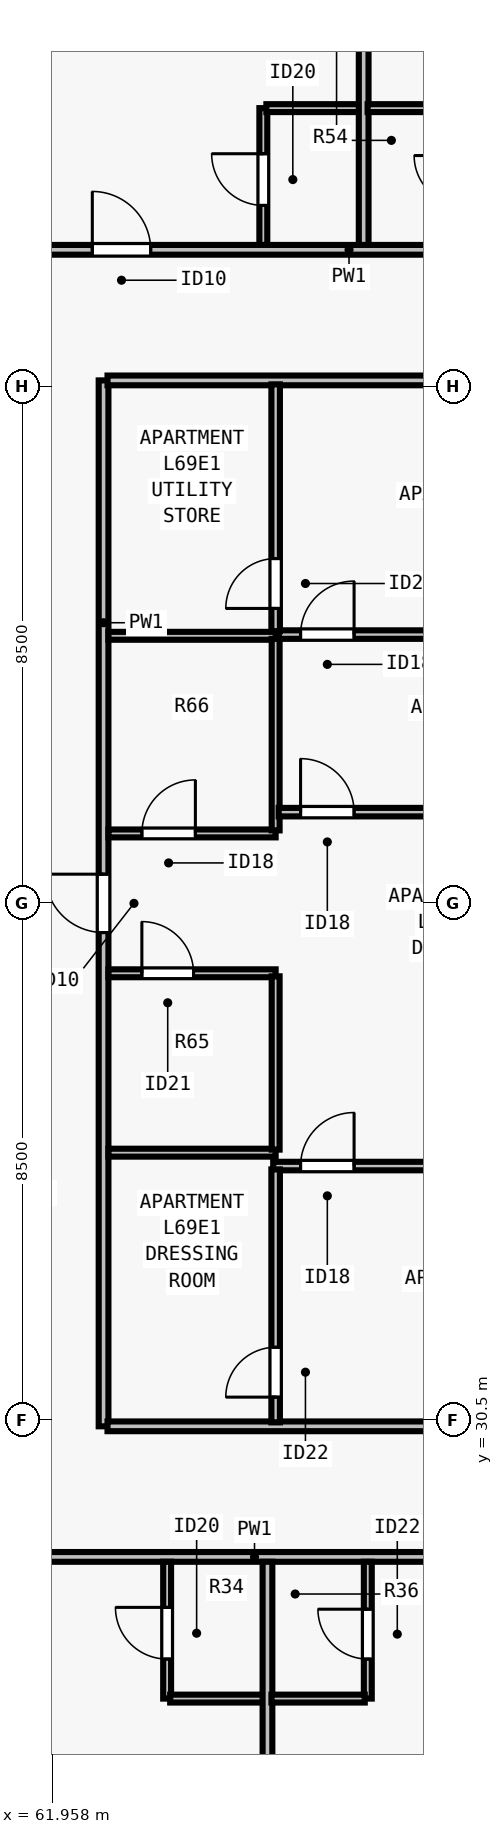
"""IFC4 building model, lengths in metres.
Left out: names, types, materials, properties, quantities, classifications, styles, units other than length and angle.
Written with IfcOpenShell. Run it as: python <this file> out.ifc"""

import sys

from ifc_helpers import new_model, si_unit, direction, frame, frame_2d, origin, place, context, subcontext, project, spatial, rectangle, extrude, element, fill, save


model = new_model("IFC4")
c1 = context("Model", 3, precision=1e-05, world=origin(), true_north=direction((0.0, 1.0)))
c2 = subcontext(c1, "Body", "Model", "MODEL_VIEW")
j1 = project(units=[si_unit("LENGTHUNIT", "METRE"), si_unit("PLANEANGLEUNIT", "RADIAN")], contexts=[c1])
p1 = place(None, origin())
s1 = spatial("IfcSite", under=j1, at=p1, CompositionType="ELEMENT")
p2 = place(p1, origin())
s2 = spatial("IfcBuilding", under=s1, at=p2, CompositionType="ELEMENT")
p3 = place(p2, frame((0.0, 0.0, 251.5)))
s3 = spatial("IfcBuildingStorey", under=s2, at=p3, CompositionType="ELEMENT", Elevation=251.5)
p4 = place(p3, frame((29.915, 28.252, 0.0), z_axis=(0.0, 0.0, 1.0), x_axis=(1.0, 0.0, 0.0)))
e1 = element("IfcWall", 1, at=p4, inside=s3, PredefinedType="PARTITIONING", context=c2, shape_type="SweptSolid", body=[
    extrude(rectangle(XDim=44.28, YDim=0.16, at=frame_2d((22.14, 0.0))), origin(), (0.0, 0.0, 1.0), 2.958),
])
p5 = place(p4, frame((5.002, 0.0, 0.0)))
e2 = element("IfcOpeningElement", 2, at=p5, cuts=e1, PredefinedType="OPENING", context=c2, shape_type="SweptSolid", body=[
    extrude(rectangle(XDim=0.96, YDim=2.18, at=frame_2d((0.48, 1.09))), frame((0.0, 0.09, 0.0), z_axis=(0.0, -1.0, 0.0), x_axis=(1.0, 0.0, 0.0)), (0.0, 0.0, 1.0), 0.18),
])
p6 = place(p4, frame((12.718, 0.0, 0.0)))
e3 = element("IfcOpeningElement", 3, at=p6, cuts=e1, PredefinedType="OPENING", context=c2, shape_type="SweptSolid", body=[
    extrude(rectangle(XDim=0.96, YDim=2.18, at=frame_2d((0.48, 1.09))), frame((0.0, 0.09, 0.0), z_axis=(0.0, -1.0, 0.0), x_axis=(1.0, 0.0, 0.0)), (0.0, 0.0, 1.0), 0.18),
])
p7 = place(p4, frame((21.55, 0.0, 0.0)))
e4 = element("IfcOpeningElement", 4, at=p7, cuts=e1, PredefinedType="OPENING", context=c2, shape_type="SweptSolid", body=[
    extrude(rectangle(XDim=0.96, YDim=2.18, at=frame_2d((0.48, 1.09))), frame((0.0, 0.09, 0.0), z_axis=(0.0, -1.0, 0.0), x_axis=(1.0, 0.0, 0.0)), (0.0, 0.0, 1.0), 0.18),
])
p8 = place(p4, frame((30.382, 0.0, 0.0)))
e5 = element("IfcOpeningElement", 5, at=p8, cuts=e1, PredefinedType="OPENING", context=c2, shape_type="SweptSolid", body=[
    extrude(rectangle(XDim=0.96, YDim=2.18, at=frame_2d((0.48, 1.09))), frame((0.0, 0.09, 0.0), z_axis=(0.0, -1.0, 0.0), x_axis=(1.0, 0.0, 0.0)), (0.0, 0.0, 1.0), 0.18),
])
p9 = place(p4, frame((39.393, 0.0, 0.0)))
e6 = element("IfcOpeningElement", 6, at=p9, cuts=e1, PredefinedType="OPENING", context=c2, shape_type="SweptSolid", body=[
    extrude(rectangle(XDim=0.96, YDim=2.18, at=frame_2d((0.48, 1.09))), frame((0.0, 0.09, 0.0), z_axis=(0.0, -1.0, 0.0), x_axis=(1.0, 0.0, 0.0)), (0.0, 0.0, 1.0), 0.18),
])
p10 = place(p3, frame((29.805, 49.748, 0.0), z_axis=(0.0, 0.0, 1.0), x_axis=(1.0, 0.0, 0.0)))
e7 = element("IfcWall", 7, at=p10, inside=s3, PredefinedType="PARTITIONING", context=c2, shape_type="SweptSolid", body=[
    extrude(rectangle(XDim=44.39, YDim=0.16, at=frame_2d((22.195, 0.0))), origin(), (0.0, 0.0, 1.0), 2.958),
])
p11 = place(p10, frame((3.494, 0.0, 0.0)))
e8 = element("IfcOpeningElement", 8, at=p11, cuts=e7, PredefinedType="OPENING", context=c2, shape_type="SweptSolid", body=[
    extrude(rectangle(XDim=0.96, YDim=2.18, at=frame_2d((0.48, 1.09))), frame((0.0, 0.09, 0.0), z_axis=(0.0, -1.0, 0.0), x_axis=(1.0, 0.0, 0.0)), (0.0, 0.0, 1.0), 0.18),
])
p12 = place(p10, frame((10.73, 0.0, 0.0)))
e9 = element("IfcOpeningElement", 9, at=p12, cuts=e7, PredefinedType="OPENING", context=c2, shape_type="SweptSolid", body=[
    extrude(rectangle(XDim=0.96, YDim=2.18, at=frame_2d((0.48, 1.09))), frame((0.0, 0.09, 0.0), z_axis=(0.0, -1.0, 0.0), x_axis=(1.0, 0.0, 0.0)), (0.0, 0.0, 1.0), 0.18),
])
p13 = place(p10, frame((18.09, 0.0, 0.0)))
e10 = element("IfcOpeningElement", 10, at=p13, cuts=e7, PredefinedType="OPENING", context=c2, shape_type="SweptSolid", body=[
    extrude(rectangle(XDim=0.96, YDim=2.18, at=frame_2d((0.48, 1.09))), frame((0.0, 0.09, 0.0), z_axis=(0.0, -1.0, 0.0), x_axis=(1.0, 0.0, 0.0)), (0.0, 0.0, 1.0), 0.18),
])
p14 = place(p10, frame((25.45, 0.0, 0.0)))
e11 = element("IfcOpeningElement", 11, at=p14, cuts=e7, PredefinedType="OPENING", context=c2, shape_type="SweptSolid", body=[
    extrude(rectangle(XDim=0.96, YDim=2.18, at=frame_2d((0.48, 1.09))), frame((0.0, 0.09, 0.0), z_axis=(0.0, -1.0, 0.0), x_axis=(1.0, 0.0, 0.0)), (0.0, 0.0, 1.0), 0.18),
])
p15 = place(p10, frame((32.81, 0.0, 0.0)))
e12 = element("IfcOpeningElement", 12, at=p15, cuts=e7, PredefinedType="OPENING", context=c2, shape_type="SweptSolid", body=[
    extrude(rectangle(XDim=0.96, YDim=2.18, at=frame_2d((0.48, 1.09))), frame((0.0, 0.09, 0.0), z_axis=(0.0, -1.0, 0.0), x_axis=(1.0, 0.0, 0.0)), (0.0, 0.0, 1.0), 0.18),
])
p16 = place(p10, frame((40.294, 0.0, 0.0)))
e13 = element("IfcOpeningElement", 13, at=p16, cuts=e7, PredefinedType="OPENING", context=c2, shape_type="SweptSolid", body=[
    extrude(rectangle(XDim=0.96, YDim=2.18, at=frame_2d((0.48, 1.09))), frame((0.0, 0.09, 0.0), z_axis=(0.0, -1.0, 0.0), x_axis=(1.0, 0.0, 0.0)), (0.0, 0.0, 1.0), 0.18),
])
p17 = place(p3, frame((62.8, 30.4, 0.0), z_axis=(0.0, 0.0, 1.0), x_axis=(0.0, 1.0, 0.0)))
e14 = element("IfcWall", 14, at=p17, inside=s3, PredefinedType="PARTITIONING", context=c2, shape_type="SweptSolid", body=[
    extrude(rectangle(XDim=17.2, YDim=0.16, at=frame_2d((8.6, 0.0))), origin(), (0.0, 0.0, 1.0), 3.29),
])
p18 = place(p17, frame((8.12, 0.0, 0.0)))
e15 = element("IfcOpeningElement", 15, at=p18, cuts=e14, PredefinedType="OPENING", context=c2, shape_type="SweptSolid", body=[
    extrude(rectangle(XDim=0.96, YDim=2.18, at=frame_2d((0.48, 1.09))), frame((0.0, 0.09, 0.0), z_axis=(0.0, -1.0, 0.0), x_axis=(1.0, 0.0, 0.0)), (0.0, 0.0, 1.0), 0.18),
])
for number, where, z_axis, x_axis in (
    (16, (62.865, 30.4, 0.0), (0.0, 0.0, 1.0), (1.0, 0.0, 0.0)),
    (17, (62.865, 47.6, 0.0), (0.0, 0.0, 1.0), (1.0, 0.0, 0.0)),
):
    element("IfcWall", number, at=place(p3, frame(where, z_axis=z_axis, x_axis=x_axis)), inside=s3, PredefinedType="PARTITIONING", context=c2, shape_type="SweptSolid", body=[
        extrude(rectangle(XDim=11.33, YDim=0.16, at=frame_2d((5.665, 0.0))), origin(), (0.0, 0.0, 1.0), 3.29),
    ])
p19 = place(p3, frame((63.845, 25.923, 0.0), z_axis=(0.0, 0.0, 1.0), x_axis=(0.0, 1.0, 0.0)))
e18 = element("IfcWall", 18, at=p19, inside=s3, PredefinedType="PLUMBINGWALL", context=c2, shape_type="SweptSolid", body=[
    extrude(rectangle(XDim=2.25, YDim=0.13, at=frame_2d((1.125, 0.0))), origin(), (0.0, 0.0, 1.0), 3.29),
])
p20 = place(p19, frame((0.65, 0.0, 0.0)))
e19 = element("IfcOpeningElement", 19, at=p20, cuts=e18, PredefinedType="OPENING", context=c2, shape_type="SweptSolid", body=[
    extrude(rectangle(XDim=0.85, YDim=2.1, at=frame_2d((0.425, 1.05))), frame((0.0, 0.075, 0.0), z_axis=(0.0, -1.0, 0.0), x_axis=(1.0, 0.0, 0.0)), (0.0, 0.0, 1.0), 0.15),
])
p21 = place(p3, frame((63.896, 25.923, 0.0), z_axis=(0.0, 0.0, 1.0), x_axis=(1.0, 0.0, 0.0)))
e20 = element("IfcWall", 20, at=p21, inside=s3, PredefinedType="PLUMBINGWALL", context=c2, shape_type="SweptSolid", body=[
    extrude(rectangle(XDim=1.6, YDim=0.13, at=frame_2d((0.8, 0.0))), origin(), (0.0, 0.0, 1.0), 3.29),
])
p22 = place(p3, frame((65.496, 16.805, 0.0), z_axis=(0.0, 0.0, 1.0), x_axis=(0.0, 1.0, 0.0)))
e21 = element("IfcWall", 21, at=p22, inside=s3, PredefinedType="PARTITIONING", context=c2, shape_type="SweptSolid", body=[
    extrude(rectangle(XDim=11.368, YDim=0.16, at=frame_2d((5.684, 0.0))), origin(), (0.0, 0.0, 1.0), 2.573),
])
p23 = place(p3, frame((67.146, 25.923, 0.0), z_axis=(0.0, 0.0, 1.0), x_axis=(0.0, 1.0, 0.0)))
e22 = element("IfcWall", 22, at=p23, inside=s3, PredefinedType="PLUMBINGWALL", context=c2, shape_type="SweptSolid", body=[
    extrude(rectangle(XDim=2.25, YDim=0.13, at=frame_2d((1.125, 0.0))), origin(), (0.0, 0.0, 1.0), 3.29),
])
p24 = place(p23, frame((0.65, 0.0, 0.0)))
e23 = element("IfcOpeningElement", 23, at=p24, cuts=e22, PredefinedType="OPENING", context=c2, shape_type="SweptSolid", body=[
    extrude(rectangle(XDim=0.82, YDim=2.1, at=frame_2d((0.41, 1.05))), frame((0.0, 0.075, 0.0), z_axis=(0.0, -1.0, 0.0), x_axis=(1.0, 0.0, 0.0)), (0.0, 0.0, 1.0), 0.15),
])
p25 = place(p3, frame((65.561, 25.923, 0.0), z_axis=(0.0, 0.0, 1.0), x_axis=(1.0, 0.0, 0.0)))
e24 = element("IfcWall", 24, at=p25, inside=s3, PredefinedType="PLUMBINGWALL", context=c2, shape_type="SweptSolid", body=[
    extrude(rectangle(XDim=1.535, YDim=0.13, at=frame_2d((0.768, 0.0))), origin(), (0.0, 0.0, 1.0), 3.29),
])
p26 = place(p3, frame((65.427, 49.827, 0.0), z_axis=(0.0, 0.0, 1.0), x_axis=(0.0, 1.0, 0.0)))
e25 = element("IfcWall", 25, at=p26, inside=s3, PredefinedType="PLUMBINGWALL", context=c2, shape_type="SweptSolid", body=[
    extrude(rectangle(XDim=2.25, YDim=0.13, at=frame_2d((1.125, 0.0))), origin(), (0.0, 0.0, 1.0), 3.29),
])
p27 = place(p26, frame((0.65, 0.0, 0.0)))
e26 = element("IfcOpeningElement", 26, at=p27, cuts=e25, PredefinedType="OPENING", context=c2, shape_type="SweptSolid", body=[
    extrude(rectangle(XDim=0.85, YDim=2.1, at=frame_2d((0.425, 1.05))), frame((0.0, 0.075, 0.0), z_axis=(0.0, -1.0, 0.0), x_axis=(1.0, 0.0, 0.0)), (0.0, 0.0, 1.0), 0.15),
])
p28 = place(p3, frame((65.478, 52.077, 0.0), z_axis=(0.0, 0.0, 1.0), x_axis=(1.0, 0.0, 0.0)))
e27 = element("IfcWall", 27, at=p28, inside=s3, PredefinedType="PLUMBINGWALL", context=c2, shape_type="SweptSolid", body=[
    extrude(rectangle(XDim=1.6, YDim=0.13, at=frame_2d((0.8, 0.0))), origin(), (0.0, 0.0, 1.0), 3.29),
])
p29 = place(p3, frame((67.077, 49.827, 0.0), z_axis=(0.0, 0.0, 1.0), x_axis=(0.0, 1.0, 0.0)))
e28 = element("IfcWall", 28, at=p29, inside=s3, PredefinedType="PARTITIONING", context=c2, shape_type="SweptSolid", body=[
    extrude(rectangle(XDim=11.368, YDim=0.16, at=frame_2d((5.684, 0.0))), origin(), (0.0, 0.0, 1.0), 2.573),
])
p30 = place(p3, frame((67.143, 52.077, 0.0), z_axis=(0.0, 0.0, 1.0), x_axis=(1.0, 0.0, 0.0)))
e29 = element("IfcWall", 29, at=p30, inside=s3, PredefinedType="PLUMBINGWALL", context=c2, shape_type="SweptSolid", body=[
    extrude(rectangle(XDim=1.535, YDim=0.13, at=frame_2d((0.768, 0.0))), origin(), (0.0, 0.0, 1.0), 2.958),
])
p31 = place(p3, frame((62.88, 34.9, 0.0), z_axis=(0.0, 0.0, 1.0), x_axis=(1.0, 0.0, 0.0)))
e30 = element("IfcWall", 30, at=p31, inside=s3, PredefinedType="PLUMBINGWALL", context=c2, shape_type="SweptSolid", body=[
    extrude(rectangle(XDim=2.75, YDim=0.13, at=frame_2d((1.375, 0.0))), origin(), (0.0, 0.0, 1.0), 3.29),
])
p32 = place(p3, frame((62.88, 37.85, 0.0), z_axis=(0.0, 0.0, 1.0), x_axis=(1.0, 0.0, 0.0)))
e31 = element("IfcWall", 31, at=p32, inside=s3, PredefinedType="PLUMBINGWALL", context=c2, shape_type="SweptSolid", body=[
    extrude(rectangle(XDim=2.75, YDim=0.13, at=frame_2d((1.375, 0.0))), origin(), (0.0, 0.0, 1.0), 3.29),
])
p33 = place(p32, frame((0.55, 0.0, 0.0)))
e32 = element("IfcOpeningElement", 32, at=p33, cuts=e31, PredefinedType="OPENING", context=c2, shape_type="SweptSolid", body=[
    extrude(rectangle(XDim=0.85, YDim=2.08, at=frame_2d((0.425, 1.04))), frame((0.0, 0.075, 0.0), z_axis=(0.0, -1.0, 0.0), x_axis=(1.0, 0.0, 0.0)), (0.0, 0.0, 1.0), 0.15),
])
p34 = place(p3, frame((65.63, 34.95, 0.0), z_axis=(0.0, 0.0, 1.0), x_axis=(0.0, 1.0, 0.0)))
e33 = element("IfcWall", 33, at=p34, inside=s3, PredefinedType="PLUMBINGWALL", context=c2, shape_type="SweptSolid", body=[
    extrude(rectangle(XDim=2.85, YDim=0.13, at=frame_2d((1.425, 0.0))), origin(), (0.0, 0.0, 1.0), 3.29),
])
p35 = place(p3, frame((62.88, 43.4, 0.0), z_axis=(0.0, 0.0, 1.0), x_axis=(1.0, 0.0, 0.0)))
e34 = element("IfcWall", 34, at=p35, inside=s3, PredefinedType="PLUMBINGWALL", context=c2, shape_type="SweptSolid", body=[
    extrude(rectangle(XDim=2.75, YDim=0.13, at=frame_2d((1.375, 0.0))), origin(), (0.0, 0.0, 1.0), 3.29),
])
p36 = place(p3, frame((62.88, 40.15, 0.0), z_axis=(0.0, 0.0, 1.0), x_axis=(1.0, 0.0, 0.0)))
e35 = element("IfcWall", 35, at=p36, inside=s3, PredefinedType="PLUMBINGWALL", context=c2, shape_type="SweptSolid", body=[
    extrude(rectangle(XDim=2.75, YDim=0.13, at=frame_2d((1.375, 0.0))), origin(), (0.0, 0.0, 1.0), 3.29),
])
p37 = place(p36, frame((0.55, 0.0, 0.0)))
e36 = element("IfcOpeningElement", 36, at=p37, cuts=e35, PredefinedType="OPENING", context=c2, shape_type="SweptSolid", body=[
    extrude(rectangle(XDim=0.88, YDim=2.1, at=frame_2d((0.44, 1.05))), frame((0.0, 0.075, 0.0), z_axis=(0.0, -1.0, 0.0), x_axis=(1.0, 0.0, 0.0)), (0.0, 0.0, 1.0), 0.15),
])
p38 = place(p3, frame((65.63, 40.2, 0.0), z_axis=(0.0, 0.0, 1.0), x_axis=(0.0, 1.0, 0.0)))
e37 = element("IfcWall", 37, at=p38, inside=s3, PredefinedType="PLUMBINGWALL", context=c2, shape_type="SweptSolid", body=[
    extrude(rectangle(XDim=3.15, YDim=0.13, at=frame_2d((1.575, 0.0))), origin(), (0.0, 0.0, 1.0), 3.29),
])
p39 = place(p3, frame((65.59, 34.68, 0.0), z_axis=(0.0, 0.0, 1.0), x_axis=(1.0, 0.0, 0.0)))
e38 = element("IfcWall", 38, at=p39, inside=s3, PredefinedType="PARTITIONING", context=c2, shape_type="SweptSolid", body=[
    extrude(rectangle(XDim=8.53, YDim=0.14, at=frame_2d((4.265, 0.0))), origin(), (0.0, 0.0, 1.0), 3.29),
])
p40 = place(p39, frame((0.45, 0.0, 0.0)))
e39 = element("IfcOpeningElement", 39, at=p40, cuts=e38, PredefinedType="OPENING", context=c2, shape_type="SweptSolid", body=[
    extrude(rectangle(XDim=0.88, YDim=2.1, at=frame_2d((0.44, 1.05))), frame((0.0, 0.08, 0.0), z_axis=(0.0, -1.0, 0.0), x_axis=(1.0, 0.0, 0.0)), (0.0, 0.0, 1.0), 0.16),
])
p41 = place(p3, frame((65.63, 30.465, 0.0), z_axis=(0.0, 0.0, 1.0), x_axis=(0.0, 1.0, 0.0)))
e40 = element("IfcWall", 40, at=p41, inside=s3, PredefinedType="PARTITIONING", context=c2, shape_type="SweptSolid", body=[
    extrude(rectangle(XDim=4.16, YDim=0.14, at=frame_2d((2.08, 0.0))), origin(), (0.0, 0.0, 1.0), 3.29),
])
p42 = place(p41, frame((0.415, 0.0, 0.0)))
e41 = element("IfcOpeningElement", 41, at=p42, cuts=e40, PredefinedType="OPENING", context=c2, shape_type="SweptSolid", body=[
    extrude(rectangle(XDim=0.82, YDim=2.1, at=frame_2d((0.41, 1.05))), frame((0.0, 0.08, 0.0), z_axis=(0.0, -1.0, 0.0), x_axis=(1.0, 0.0, 0.0)), (0.0, 0.0, 1.0), 0.16),
])
p43 = place(p3, frame((65.68, 43.42, 0.0), z_axis=(0.0, 0.0, 1.0), x_axis=(1.0, 0.0, 0.0)))
e42 = element("IfcWall", 42, at=p43, inside=s3, PredefinedType="PARTITIONING", context=c2, shape_type="SweptSolid", body=[
    extrude(rectangle(XDim=8.44, YDim=0.14, at=frame_2d((4.22, 0.0))), origin(), (0.0, 0.0, 1.0), 3.29),
])
p44 = place(p43, frame((0.36, 0.0, 0.0)))
e43 = element("IfcOpeningElement", 43, at=p44, cuts=e42, PredefinedType="OPENING", context=c2, shape_type="SweptSolid", body=[
    extrude(rectangle(XDim=0.88, YDim=2.1, at=frame_2d((0.44, 1.05))), frame((0.0, 0.08, 0.0), z_axis=(0.0, -1.0, 0.0), x_axis=(1.0, 0.0, 0.0)), (0.0, 0.0, 1.0), 0.16),
])
p45 = place(p3, frame((65.63, 43.475, 0.0), z_axis=(0.0, 0.0, 1.0), x_axis=(0.0, 1.0, 0.0)))
e44 = element("IfcWall", 44, at=p45, inside=s3, PredefinedType="PARTITIONING", context=c2, shape_type="SweptSolid", body=[
    extrude(rectangle(XDim=4.06, YDim=0.14, at=frame_2d((2.03, 0.0))), origin(), (0.0, 0.0, 1.0), 3.29),
])
p46 = place(p45, frame((0.375, 0.0, 0.0)))
e45 = element("IfcOpeningElement", 45, at=p46, cuts=e44, PredefinedType="OPENING", context=c2, shape_type="SweptSolid", body=[
    extrude(rectangle(XDim=0.82, YDim=2.1, at=frame_2d((0.41, 1.05))), frame((0.0, 0.08, 0.0), z_axis=(0.0, -1.0, 0.0), x_axis=(1.0, 0.0, 0.0)), (0.0, 0.0, 1.0), 0.16),
])
p47 = place(p3, frame((65.68, 40.5, 0.0), z_axis=(0.0, 0.0, 1.0), x_axis=(1.0, 0.0, 0.0)))
e46 = element("IfcWall", 46, at=p47, inside=s3, PredefinedType="PARTITIONING", context=c2, shape_type="SweptSolid", body=[
    extrude(rectangle(XDim=8.44, YDim=0.14, at=frame_2d((4.22, 0.0))), origin(), (0.0, 0.0, 1.0), 3.29),
])
p48 = place(p47, frame((0.36, 0.0, 0.0)))
e47 = element("IfcOpeningElement", 47, at=p48, cuts=e46, PredefinedType="OPENING", context=c2, shape_type="SweptSolid", body=[
    extrude(rectangle(XDim=0.88, YDim=2.1, at=frame_2d((0.44, 1.05))), frame((0.0, 0.08, 0.0), z_axis=(0.0, -1.0, 0.0), x_axis=(1.0, 0.0, 0.0)), (0.0, 0.0, 1.0), 0.16),
])
p49 = place(p20, origin())
e48 = element("IfcDoor", 48, at=p49, inside=s3, OperationType="SINGLE_SWING_RIGHT", PredefinedType="DOOR", context=c2, shape_type="SweptSolid", body=[
    extrude(rectangle(XDim=0.85, YDim=2.1, at=frame_2d((0.425, 1.05))), frame((0.0, 0.025, 0.0), z_axis=(0.0, -1.0, 0.0), x_axis=(1.0, 0.0, 0.0)), (0.0, 0.0, 1.0), 0.05),
])
fill(e19, e48)
p50 = place(p24, origin())
e49 = element("IfcDoor", 49, at=p50, inside=s3, OperationType="SINGLE_SWING_RIGHT", PredefinedType="DOOR", context=c2, shape_type="SweptSolid", body=[
    extrude(rectangle(XDim=0.82, YDim=2.1, at=frame_2d((0.41, 1.05))), frame((0.0, 0.025, 0.0), z_axis=(0.0, -1.0, 0.0), x_axis=(1.0, 0.0, 0.0)), (0.0, 0.0, 1.0), 0.05),
])
fill(e23, e49)
p51 = place(p27, origin())
e50 = element("IfcDoor", 50, at=p51, inside=s3, OperationType="SINGLE_SWING_RIGHT", PredefinedType="DOOR", context=c2, shape_type="SweptSolid", body=[
    extrude(rectangle(XDim=0.85, YDim=2.1, at=frame_2d((0.425, 1.05))), frame((0.0, 0.025, 0.0), z_axis=(0.0, -1.0, 0.0), x_axis=(1.0, 0.0, 0.0)), (0.0, 0.0, 1.0), 0.05),
])
fill(e26, e50)
p52 = place(p15, origin())
e51 = element("IfcDoor", 51, at=p52, inside=s3, OperationType="SINGLE_SWING_LEFT", PredefinedType="DOOR", context=c2, shape_type="SweptSolid", body=[
    extrude(rectangle(XDim=0.96, YDim=2.18, at=frame_2d((0.48, 1.09))), frame((0.0, 0.025, 0.0), z_axis=(0.0, -1.0, 0.0), x_axis=(1.0, 0.0, 0.0)), (0.0, 0.0, 1.0), 0.05),
])
fill(e12, e51)
p53 = place(p33, origin())
e52 = element("IfcDoor", 52, at=p53, inside=s3, OperationType="SINGLE_SWING_LEFT", PredefinedType="DOOR", context=c2, shape_type="SweptSolid", body=[
    extrude(rectangle(XDim=0.85, YDim=2.08, at=frame_2d((0.425, 1.04))), frame((0.0, 0.025, 0.0), z_axis=(0.0, -1.0, 0.0), x_axis=(1.0, 0.0, 0.0)), (0.0, 0.0, 1.0), 0.05),
])
fill(e32, e52)
p54 = place(p37, origin())
e53 = element("IfcDoor", 53, at=p54, inside=s3, OperationType="SINGLE_SWING_RIGHT", PredefinedType="DOOR", context=c2, shape_type="SweptSolid", body=[
    extrude(rectangle(XDim=0.88, YDim=2.1, at=frame_2d((0.44, 1.05))), frame((0.0, 0.025, 0.0), z_axis=(0.0, -1.0, 0.0), x_axis=(1.0, 0.0, 0.0)), (0.0, 0.0, 1.0), 0.05),
])
fill(e36, e53)
p55 = place(p42, origin())
e54 = element("IfcDoor", 54, at=p55, inside=s3, OperationType="SINGLE_SWING_LEFT", PredefinedType="DOOR", context=c2, shape_type="SweptSolid", body=[
    extrude(rectangle(XDim=0.82, YDim=2.1, at=frame_2d((0.41, 1.05))), frame((0.0, 0.025, 0.0), z_axis=(0.0, -1.0, 0.0), x_axis=(1.0, 0.0, 0.0)), (0.0, 0.0, 1.0), 0.05),
])
fill(e41, e54)
p56 = place(p40, origin())
e55 = element("IfcDoor", 55, at=p56, inside=s3, OperationType="SINGLE_SWING_RIGHT", PredefinedType="DOOR", context=c2, shape_type="SweptSolid", body=[
    extrude(rectangle(XDim=0.88, YDim=2.1, at=frame_2d((0.44, 1.05))), frame((0.0, 0.025, 0.0), z_axis=(0.0, -1.0, 0.0), x_axis=(1.0, 0.0, 0.0)), (0.0, 0.0, 1.0), 0.05),
])
fill(e39, e55)
p57 = place(p46, origin())
e56 = element("IfcDoor", 56, at=p57, inside=s3, OperationType="SINGLE_SWING_LEFT", PredefinedType="DOOR", context=c2, shape_type="SweptSolid", body=[
    extrude(rectangle(XDim=0.82, YDim=2.1, at=frame_2d((0.41, 1.05))), frame((0.0, 0.025, 0.0), z_axis=(0.0, -1.0, 0.0), x_axis=(1.0, 0.0, 0.0)), (0.0, 0.0, 1.0), 0.05),
])
fill(e45, e56)
p58 = place(p44, origin())
e57 = element("IfcDoor", 57, at=p58, inside=s3, OperationType="SINGLE_SWING_RIGHT", PredefinedType="DOOR", context=c2, shape_type="SweptSolid", body=[
    extrude(rectangle(XDim=0.88, YDim=2.1, at=frame_2d((0.44, 1.05))), frame((0.0, 0.025, 0.0), z_axis=(0.0, -1.0, 0.0), x_axis=(1.0, 0.0, 0.0)), (0.0, 0.0, 1.0), 0.05),
])
fill(e43, e57)
p59 = place(p48, origin())
e58 = element("IfcDoor", 58, at=p59, inside=s3, OperationType="SINGLE_SWING_LEFT", PredefinedType="DOOR", context=c2, shape_type="SweptSolid", body=[
    extrude(rectangle(XDim=0.88, YDim=2.1, at=frame_2d((0.44, 1.05))), frame((0.0, 0.025, 0.0), z_axis=(0.0, -1.0, 0.0), x_axis=(1.0, 0.0, 0.0)), (0.0, 0.0, 1.0), 0.05),
])
fill(e47, e58)
p60 = place(p18, origin())
e59 = element("IfcDoor", 59, at=p60, inside=s3, OperationType="SINGLE_SWING_RIGHT", PredefinedType="DOOR", context=c2, shape_type="SweptSolid", body=[
    extrude(rectangle(XDim=0.96, YDim=2.18, at=frame_2d((0.48, 1.09))), frame((0.0, 0.025, 0.0), z_axis=(0.0, -1.0, 0.0), x_axis=(1.0, 0.0, 0.0)), (0.0, 0.0, 1.0), 0.05),
])
fill(e15, e59)
save(model, sys.argv[1])
